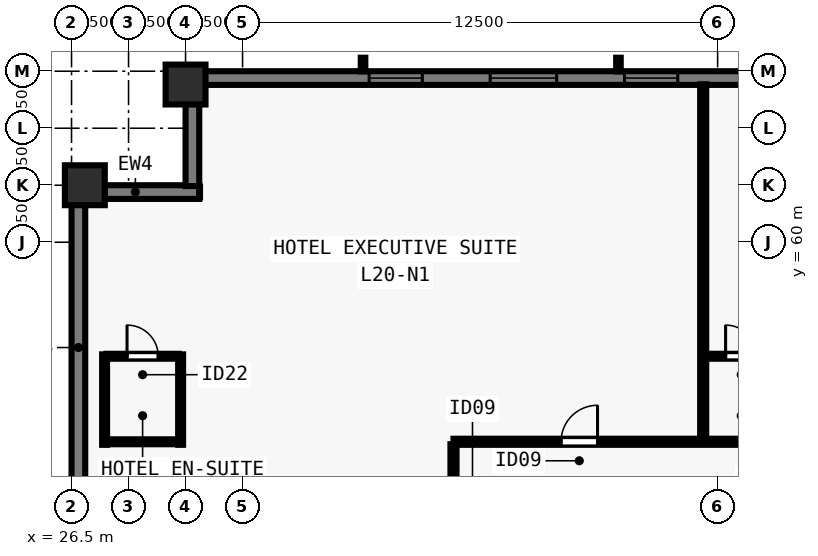
"""IFC4 building model, lengths in metres.
Left out: names, types, materials, properties, quantities, classifications, styles, units other than length and angle.
Written with IfcOpenShell. Run it as: python <this file> out.ifc"""

import sys

from ifc_helpers import new_model, si_unit, direction, frame, frame_2d, origin, origin_2d, place, context, subcontext, project, spatial, rectangle, extrude, element, fill, save


model = new_model("IFC4")
c1 = context("Model", 3, precision=1e-05, world=origin(), true_north=direction((0.0, 1.0)))
c2 = subcontext(c1, "Body", "Model", "MODEL_VIEW")
j1 = project(units=[si_unit("LENGTHUNIT", "METRE"), si_unit("PLANEANGLEUNIT", "RADIAN")], contexts=[c1])
p1 = place(None, origin())
s1 = spatial("IfcSite", under=j1, at=p1, CompositionType="ELEMENT")
p2 = place(p1, origin())
s2 = spatial("IfcBuilding", under=s1, at=p2, CompositionType="ELEMENT")
p3 = place(p2, frame((0.0, 0.0, 76.0)))
s3 = spatial("IfcBuildingStorey", under=s2, at=p3, CompositionType="ELEMENT", Elevation=76.0)
for number, where, z_axis, x_axis in (
    (1, (29.5, 64.15, 0.0), (0.0, 0.0, 1.0), (1.0, 0.0, 0.0)),
    (2, (26.85, 61.5, 0.0), (0.0, 0.0, 1.0), (0.0, 1.0, 0.0)),
):
    element("IfcColumn", number, at=place(p3, frame(where, z_axis=z_axis, x_axis=x_axis)), inside=s3, PredefinedType="COLUMN", context=c2, shape_type="SweptSolid", body=[
        extrude(rectangle(XDim=1.05, YDim=1.05, at=origin_2d()), origin(), (0.0, 0.0, 1.0), 3.5),
    ])
p4 = place(p3, frame((26.68, 16.5, 0.0), z_axis=(0.0, 0.0, 1.0), x_axis=(0.0, 1.0, 0.0)))
e3 = element("IfcWall", 3, at=p4, inside=s3, PredefinedType="SOLIDWALL", context=c2, shape_type="SweptSolid", body=[
    extrude(rectangle(XDim=44.662, YDim=0.36, at=frame_2d((22.331, 0.0))), origin(), (0.0, 0.0, 1.0), 3.28),
])
p5 = place(p4, frame((4.83, 0.0, 0.8)))
e4 = element("IfcOpeningElement", 4, at=p5, cuts=e3, PredefinedType="OPENING", context=c2, shape_type="SweptSolid", body=[
    extrude(rectangle(XDim=1.4, YDim=1.544, at=frame_2d((0.7, 0.772))), frame((0.0, 0.19, 0.0), z_axis=(0.0, -1.0, 0.0), x_axis=(1.0, 0.0, 0.0)), (0.0, 0.0, 1.0), 0.38),
])
p6 = place(p4, frame((8.015, 0.0, 0.8)))
e5 = element("IfcOpeningElement", 5, at=p6, cuts=e3, PredefinedType="OPENING", context=c2, shape_type="SweptSolid", body=[
    extrude(rectangle(XDim=1.75, YDim=1.544, at=frame_2d((0.875, 0.772))), frame((0.0, 0.19, 0.0), z_axis=(0.0, -1.0, 0.0), x_axis=(1.0, 0.0, 0.0)), (0.0, 0.0, 1.0), 0.38),
])
p7 = place(p4, frame((11.551, 0.0, 0.8)))
e6 = element("IfcOpeningElement", 6, at=p7, cuts=e3, PredefinedType="OPENING", context=c2, shape_type="SweptSolid", body=[
    extrude(rectangle(XDim=1.4, YDim=1.544, at=frame_2d((0.7, 0.772))), frame((0.0, 0.19, 0.0), z_axis=(0.0, -1.0, 0.0), x_axis=(1.0, 0.0, 0.0)), (0.0, 0.0, 1.0), 0.38),
])
p8 = place(p4, frame((18.721, 0.0, 0.8)))
e7 = element("IfcOpeningElement", 7, at=p8, cuts=e3, PredefinedType="OPENING", context=c2, shape_type="SweptSolid", body=[
    extrude(rectangle(XDim=1.4, YDim=1.544, at=frame_2d((0.7, 0.772))), frame((0.0, 0.19, 0.0), z_axis=(0.0, -1.0, 0.0), x_axis=(1.0, 0.0, 0.0)), (0.0, 0.0, 1.0), 0.38),
])
p9 = place(p4, frame((22.706, 0.0, 0.8)))
e8 = element("IfcOpeningElement", 8, at=p9, cuts=e3, PredefinedType="OPENING", context=c2, shape_type="SweptSolid", body=[
    extrude(rectangle(XDim=1.75, YDim=1.544, at=frame_2d((0.875, 0.772))), frame((0.0, 0.19, 0.0), z_axis=(0.0, -1.0, 0.0), x_axis=(1.0, 0.0, 0.0)), (0.0, 0.0, 1.0), 0.38),
])
p10 = place(p4, frame((24.991, 0.0, 0.8)))
e9 = element("IfcOpeningElement", 9, at=p10, cuts=e3, PredefinedType="OPENING", context=c2, shape_type="SweptSolid", body=[
    extrude(rectangle(XDim=1.4, YDim=1.544, at=frame_2d((0.7, 0.772))), frame((0.0, 0.19, 0.0), z_axis=(0.0, -1.0, 0.0), x_axis=(1.0, 0.0, 0.0)), (0.0, 0.0, 1.0), 0.38),
])
p11 = place(p4, frame((28.177, 0.0, 0.8)))
e10 = element("IfcOpeningElement", 10, at=p11, cuts=e3, PredefinedType="OPENING", context=c2, shape_type="SweptSolid", body=[
    extrude(rectangle(XDim=1.75, YDim=1.544, at=frame_2d((0.875, 0.772))), frame((0.0, 0.19, 0.0), z_axis=(0.0, -1.0, 0.0), x_axis=(1.0, 0.0, 0.0)), (0.0, 0.0, 1.0), 0.38),
])
p12 = place(p4, frame((31.711, 0.0, 0.8)))
e11 = element("IfcOpeningElement", 11, at=p12, cuts=e3, PredefinedType="OPENING", context=c2, shape_type="SweptSolid", body=[
    extrude(rectangle(XDim=1.4, YDim=1.544, at=frame_2d((0.7, 0.772))), frame((0.0, 0.19, 0.0), z_axis=(0.0, -1.0, 0.0), x_axis=(1.0, 0.0, 0.0)), (0.0, 0.0, 1.0), 0.38),
])
p13 = place(p4, frame((34.897, 0.0, 0.8)))
e12 = element("IfcOpeningElement", 12, at=p13, cuts=e3, PredefinedType="OPENING", context=c2, shape_type="SweptSolid", body=[
    extrude(rectangle(XDim=1.75, YDim=1.544, at=frame_2d((0.875, 0.772))), frame((0.0, 0.19, 0.0), z_axis=(0.0, -1.0, 0.0), x_axis=(1.0, 0.0, 0.0)), (0.0, 0.0, 1.0), 0.38),
])
p14 = place(p3, frame((26.5, 61.32, 0.0), z_axis=(0.0, 0.0, 1.0), x_axis=(1.0, 0.0, 0.0)))
e13 = element("IfcWall", 13, at=p14, inside=s3, PredefinedType="SOLIDWALL", context=c2, shape_type="SweptSolid", body=[
    extrude(rectangle(XDim=3.36, YDim=0.36, at=frame_2d((1.68, 0.0))), origin(), (0.0, 0.0, 1.0), 3.28),
])
p15 = place(p3, frame((29.68, 61.478, 0.0), z_axis=(0.0, 0.0, 1.0), x_axis=(0.0, 1.0, 0.0)))
e14 = element("IfcWall", 14, at=p15, inside=s3, PredefinedType="SOLIDWALL", context=c2, shape_type="SweptSolid", body=[
    extrude(rectangle(XDim=2.684, YDim=0.36, at=frame_2d((1.342, 0.0))), origin(), (0.0, 0.0, 1.0), 3.28),
])
p16 = place(p3, frame((29.5, 64.32, 0.0), z_axis=(0.0, 0.0, 1.0), x_axis=(1.0, 0.0, 0.0)))
e15 = element("IfcWall", 15, at=p16, inside=s3, PredefinedType="SOLIDWALL", context=c2, shape_type="SweptSolid", body=[
    extrude(rectangle(XDim=44.662, YDim=0.36, at=frame_2d((22.331, 0.0))), origin(), (0.0, 0.0, 1.0), 3.28),
])
p17 = place(p16, frame((4.83, 0.0, 0.8)))
e16 = element("IfcOpeningElement", 16, at=p17, cuts=e15, PredefinedType="OPENING", context=c2, shape_type="SweptSolid", body=[
    extrude(rectangle(XDim=1.4, YDim=1.544, at=frame_2d((0.7, 0.772))), frame((0.0, 0.19, 0.0), z_axis=(0.0, -1.0, 0.0), x_axis=(1.0, 0.0, 0.0)), (0.0, 0.0, 1.0), 0.38),
])
p18 = place(p16, frame((8.015, 0.0, 0.8)))
e17 = element("IfcOpeningElement", 17, at=p18, cuts=e15, PredefinedType="OPENING", context=c2, shape_type="SweptSolid", body=[
    extrude(rectangle(XDim=1.75, YDim=1.544, at=frame_2d((0.875, 0.772))), frame((0.0, 0.19, 0.0), z_axis=(0.0, -1.0, 0.0), x_axis=(1.0, 0.0, 0.0)), (0.0, 0.0, 1.0), 0.38),
])
p19 = place(p16, frame((11.551, 0.0, 0.8)))
e18 = element("IfcOpeningElement", 18, at=p19, cuts=e15, PredefinedType="OPENING", context=c2, shape_type="SweptSolid", body=[
    extrude(rectangle(XDim=1.4, YDim=1.544, at=frame_2d((0.7, 0.772))), frame((0.0, 0.19, 0.0), z_axis=(0.0, -1.0, 0.0), x_axis=(1.0, 0.0, 0.0)), (0.0, 0.0, 1.0), 0.38),
])
p20 = place(p16, frame((14.736, 0.0, 0.8)))
e19 = element("IfcOpeningElement", 19, at=p20, cuts=e15, PredefinedType="OPENING", context=c2, shape_type="SweptSolid", body=[
    extrude(rectangle(XDim=1.75, YDim=1.544, at=frame_2d((0.875, 0.772))), frame((0.0, 0.19, 0.0), z_axis=(0.0, -1.0, 0.0), x_axis=(1.0, 0.0, 0.0)), (0.0, 0.0, 1.0), 0.38),
])
p21 = place(p16, frame((18.721, 0.0, 0.8)))
e20 = element("IfcOpeningElement", 20, at=p21, cuts=e15, PredefinedType="OPENING", context=c2, shape_type="SweptSolid", body=[
    extrude(rectangle(XDim=1.4, YDim=1.544, at=frame_2d((0.7, 0.772))), frame((0.0, 0.19, 0.0), z_axis=(0.0, -1.0, 0.0), x_axis=(1.0, 0.0, 0.0)), (0.0, 0.0, 1.0), 0.38),
])
p22 = place(p16, frame((21.456, 0.0, 0.8)))
e21 = element("IfcOpeningElement", 21, at=p22, cuts=e15, PredefinedType="OPENING", context=c2, shape_type="SweptSolid", body=[
    extrude(rectangle(XDim=1.75, YDim=1.544, at=frame_2d((0.875, 0.772))), frame((0.0, 0.19, 0.0), z_axis=(0.0, -1.0, 0.0), x_axis=(1.0, 0.0, 0.0)), (0.0, 0.0, 1.0), 0.38),
])
p23 = place(p16, frame((24.991, 0.0, 0.8)))
e22 = element("IfcOpeningElement", 22, at=p23, cuts=e15, PredefinedType="OPENING", context=c2, shape_type="SweptSolid", body=[
    extrude(rectangle(XDim=1.4, YDim=1.544, at=frame_2d((0.7, 0.772))), frame((0.0, 0.19, 0.0), z_axis=(0.0, -1.0, 0.0), x_axis=(1.0, 0.0, 0.0)), (0.0, 0.0, 1.0), 0.38),
])
p24 = place(p16, frame((28.177, 0.0, 0.8)))
e23 = element("IfcOpeningElement", 23, at=p24, cuts=e15, PredefinedType="OPENING", context=c2, shape_type="SweptSolid", body=[
    extrude(rectangle(XDim=1.75, YDim=1.544, at=frame_2d((0.875, 0.772))), frame((0.0, 0.19, 0.0), z_axis=(0.0, -1.0, 0.0), x_axis=(1.0, 0.0, 0.0)), (0.0, 0.0, 1.0), 0.38),
])
p25 = place(p16, frame((31.711, 0.0, 0.8)))
e24 = element("IfcOpeningElement", 24, at=p25, cuts=e15, PredefinedType="OPENING", context=c2, shape_type="SweptSolid", body=[
    extrude(rectangle(XDim=1.4, YDim=1.544, at=frame_2d((0.7, 0.772))), frame((0.0, 0.19, 0.0), z_axis=(0.0, -1.0, 0.0), x_axis=(1.0, 0.0, 0.0)), (0.0, 0.0, 1.0), 0.38),
])
p26 = place(p16, frame((34.897, 0.0, 0.8)))
e25 = element("IfcOpeningElement", 25, at=p26, cuts=e15, PredefinedType="OPENING", context=c2, shape_type="SweptSolid", body=[
    extrude(rectangle(XDim=1.75, YDim=1.544, at=frame_2d((0.875, 0.772))), frame((0.0, 0.19, 0.0), z_axis=(0.0, -1.0, 0.0), x_axis=(1.0, 0.0, 0.0)), (0.0, 0.0, 1.0), 0.38),
])
p27 = place(p16, frame((38.432, 0.0, 0.8)))
e26 = element("IfcOpeningElement", 26, at=p27, cuts=e15, PredefinedType="OPENING", context=c2, shape_type="SweptSolid", body=[
    extrude(rectangle(XDim=1.4, YDim=1.544, at=frame_2d((0.7, 0.772))), frame((0.0, 0.19, 0.0), z_axis=(0.0, -1.0, 0.0), x_axis=(1.0, 0.0, 0.0)), (0.0, 0.0, 1.0), 0.38),
])
p28 = place(p3, frame((36.55, 54.75, 0.0), z_axis=(0.0, 0.0, 1.0), x_axis=(1.0, 0.0, 0.0)))
e27 = element("IfcWall", 27, at=p28, inside=s3, PredefinedType="PARTITIONING", context=c2, shape_type="SweptSolid", body=[
    extrude(rectangle(XDim=30.9, YDim=0.16, at=frame_2d((15.45, 0.0))), origin(), (0.0, 0.0, 1.0), 3.28),
])
p29 = place(p28, frame((2.83, 0.0, 0.0)))
e28 = element("IfcOpeningElement", 28, at=p29, cuts=e27, PredefinedType="OPENING", context=c2, shape_type="SweptSolid", body=[
    extrude(rectangle(XDim=0.96, YDim=2.15, at=frame_2d((0.48, 1.075))), frame((0.0, 0.09, 0.0), z_axis=(0.0, -1.0, 0.0), x_axis=(1.0, 0.0, 0.0)), (0.0, 0.0, 1.0), 0.18),
])
p30 = place(p28, frame((15.965, 0.0, 0.0)))
e29 = element("IfcOpeningElement", 29, at=p30, cuts=e27, PredefinedType="OPENING", context=c2, shape_type="SweptSolid", body=[
    extrude(rectangle(XDim=0.96, YDim=2.15, at=frame_2d((0.48, 1.075))), frame((0.0, 0.09, 0.0), z_axis=(0.0, -1.0, 0.0), x_axis=(1.0, 0.0, 0.0)), (0.0, 0.0, 1.0), 0.18),
])
p31 = place(p28, frame((28.105, 0.0, 0.0)))
e30 = element("IfcOpeningElement", 30, at=p31, cuts=e27, PredefinedType="OPENING", context=c2, shape_type="SweptSolid", body=[
    extrude(rectangle(XDim=0.96, YDim=2.15, at=frame_2d((0.48, 1.075))), frame((0.0, 0.09, 0.0), z_axis=(0.0, -1.0, 0.0), x_axis=(1.0, 0.0, 0.0)), (0.0, 0.0, 1.0), 0.18),
])
p32 = place(p3, frame((36.55, 23.315, 0.0), z_axis=(0.0, 0.0, 1.0), x_axis=(0.0, 1.0, 0.0)))
e31 = element("IfcWall", 31, at=p32, inside=s3, PredefinedType="PARTITIONING", context=c2, shape_type="SweptSolid", body=[
    extrude(rectangle(XDim=31.37, YDim=0.16, at=frame_2d((15.685, 0.0))), origin(), (0.0, 0.0, 1.0), 3.28),
])
p33 = place(p32, frame((4.848, 0.0, 0.0)))
e32 = element("IfcOpeningElement", 32, at=p33, cuts=e31, PredefinedType="OPENING", context=c2, shape_type="SweptSolid", body=[
    extrude(rectangle(XDim=0.96, YDim=2.15, at=frame_2d((0.48, 1.075))), frame((0.0, 0.09, 0.0), z_axis=(0.0, -1.0, 0.0), x_axis=(1.0, 0.0, 0.0)), (0.0, 0.0, 1.0), 0.18),
])
p34 = place(p32, frame((12.39, 0.0, 0.0)))
e33 = element("IfcOpeningElement", 33, at=p34, cuts=e31, PredefinedType="OPENING", context=c2, shape_type="SweptSolid", body=[
    extrude(rectangle(XDim=0.96, YDim=2.15, at=frame_2d((0.48, 1.075))), frame((0.0, 0.09, 0.0), z_axis=(0.0, -1.0, 0.0), x_axis=(1.0, 0.0, 0.0)), (0.0, 0.0, 1.0), 0.18),
])
p35 = place(p32, frame((20.265, 0.0, 0.0)))
e34 = element("IfcOpeningElement", 34, at=p35, cuts=e31, PredefinedType="OPENING", context=c2, shape_type="SweptSolid", body=[
    extrude(rectangle(XDim=0.96, YDim=2.15, at=frame_2d((0.48, 1.075))), frame((0.0, 0.09, 0.0), z_axis=(0.0, -1.0, 0.0), x_axis=(1.0, 0.0, 0.0)), (0.0, 0.0, 1.0), 0.18),
])
p36 = place(p32, frame((28.223, 0.0, 0.0)))
e35 = element("IfcOpeningElement", 35, at=p36, cuts=e31, PredefinedType="OPENING", context=c2, shape_type="SweptSolid", body=[
    extrude(rectangle(XDim=0.96, YDim=2.15, at=frame_2d((0.48, 1.075))), frame((0.0, 0.09, 0.0), z_axis=(0.0, -1.0, 0.0), x_axis=(1.0, 0.0, 0.0)), (0.0, 0.0, 1.0), 0.18),
])
for number, where, z_axis, x_axis in (
    (36, (27.37, 54.67, 0.0), (0.0, 0.0, 1.0), (0.0, 1.0, 0.0)),
    (37, (29.37, 54.67, 0.0), (0.0, 0.0, 1.0), (0.0, 1.0, 0.0)),
):
    element("IfcWall", number, at=place(p3, frame(where, z_axis=z_axis, x_axis=x_axis)), inside=s3, PredefinedType="PLUMBINGWALL", context=c2, shape_type="SweptSolid", body=[
        extrude(rectangle(XDim=2.38, YDim=0.13, at=frame_2d((1.19, 0.0))), origin(), (0.0, 0.0, 1.0), 3.28),
    ])
p37 = place(p3, frame((27.42, 57.0, 0.0), z_axis=(0.0, 0.0, 1.0), x_axis=(1.0, 0.0, 0.0)))
e38 = element("IfcWall", 38, at=p37, inside=s3, PredefinedType="PLUMBINGWALL", context=c2, shape_type="SweptSolid", body=[
    extrude(rectangle(XDim=1.9, YDim=0.13, at=frame_2d((0.95, 0.0))), origin(), (0.0, 0.0, 1.0), 3.28),
])
p38 = place(p37, frame((0.54, 0.0, 0.0)))
e39 = element("IfcOpeningElement", 39, at=p38, cuts=e38, PredefinedType="OPENING", context=c2, shape_type="SweptSolid", body=[
    extrude(rectangle(XDim=0.82, YDim=2.1, at=frame_2d((0.41, 1.05))), frame((0.0, 0.075, 0.0), z_axis=(0.0, -1.0, 0.0), x_axis=(1.0, 0.0, 0.0)), (0.0, 0.0, 1.0), 0.15),
])
p39 = place(p3, frame((27.42, 54.75, 0.0), z_axis=(0.0, 0.0, 1.0), x_axis=(1.0, 0.0, 0.0)))
e40 = element("IfcWall", 40, at=p39, inside=s3, PredefinedType="PLUMBINGWALL", context=c2, shape_type="SweptSolid", body=[
    extrude(rectangle(XDim=1.9, YDim=0.13, at=frame_2d((0.95, 0.0))), origin(), (0.0, 0.0, 1.0), 3.28),
])
p40 = place(p3, frame((43.12, 54.815, 0.0), z_axis=(0.0, 0.0, 1.0), x_axis=(0.0, 1.0, 0.0)))
e41 = element("IfcWall", 41, at=p40, inside=s3, PredefinedType="PARTITIONING", context=c2, shape_type="SweptSolid", body=[
    extrude(rectangle(XDim=9.34, YDim=0.16, at=frame_2d((4.67, 0.0))), origin(), (0.0, 0.0, 1.0), 3.28),
])
p41 = place(p3, frame((43.185, 57.0, 0.0), z_axis=(0.0, 0.0, 1.0), x_axis=(1.0, 0.0, 0.0)))
e42 = element("IfcWall", 42, at=p41, inside=s3, PredefinedType="PLUMBINGWALL", context=c2, shape_type="SweptSolid", body=[
    extrude(rectangle(XDim=1.885, YDim=0.13, at=frame_2d((0.942, 0.0))), origin(), (0.0, 0.0, 1.0), 3.28),
])
p42 = place(p41, frame((0.525, 0.0, 0.0)))
e43 = element("IfcOpeningElement", 43, at=p42, cuts=e42, PredefinedType="OPENING", context=c2, shape_type="SweptSolid", body=[
    extrude(rectangle(XDim=0.82, YDim=2.1, at=frame_2d((0.41, 1.05))), frame((0.0, 0.075, 0.0), z_axis=(0.0, -1.0, 0.0), x_axis=(1.0, 0.0, 0.0)), (0.0, 0.0, 1.0), 0.15),
])
p43 = place(p17, origin())
e44 = element("IfcWindow", 44, at=p43, inside=s3, PartitioningType="SINGLE_PANEL", PredefinedType="WINDOW", context=c2, shape_type="SweptSolid", body=[
    extrude(rectangle(XDim=1.4, YDim=1.544, at=frame_2d((0.7, 0.772))), frame((0.0, -0.05, 0.0), z_axis=(0.0, -1.0, 0.0), x_axis=(1.0, 0.0, 0.0)), (0.0, 0.0, 1.0), 0.06),
])
fill(e16, e44)
p44 = place(p18, origin())
e45 = element("IfcWindow", 45, at=p44, inside=s3, PartitioningType="SINGLE_PANEL", PredefinedType="WINDOW", context=c2, shape_type="SweptSolid", body=[
    extrude(rectangle(XDim=1.75, YDim=1.544, at=frame_2d((0.875, 0.772))), frame((0.0, -0.05, 0.0), z_axis=(0.0, -1.0, 0.0), x_axis=(1.0, 0.0, 0.0)), (0.0, 0.0, 1.0), 0.06),
])
fill(e17, e45)
p45 = place(p19, origin())
e46 = element("IfcWindow", 46, at=p45, inside=s3, PartitioningType="SINGLE_PANEL", PredefinedType="WINDOW", context=c2, shape_type="SweptSolid", body=[
    extrude(rectangle(XDim=1.4, YDim=1.544, at=frame_2d((0.7, 0.772))), frame((0.0, -0.05, 0.0), z_axis=(0.0, -1.0, 0.0), x_axis=(1.0, 0.0, 0.0)), (0.0, 0.0, 1.0), 0.06),
])
fill(e18, e46)
p46 = place(p38, origin())
e47 = element("IfcDoor", 47, at=p46, inside=s3, OperationType="SINGLE_SWING_LEFT", PredefinedType="DOOR", context=c2, shape_type="SweptSolid", body=[
    extrude(rectangle(XDim=0.82, YDim=2.1, at=frame_2d((0.41, 1.05))), frame((0.0, 0.025, 0.0), z_axis=(0.0, -1.0, 0.0), x_axis=(1.0, 0.0, 0.0)), (0.0, 0.0, 1.0), 0.05),
])
fill(e39, e47)
p47 = place(p29, origin())
e48 = element("IfcDoor", 48, at=p47, inside=s3, OperationType="SINGLE_SWING_RIGHT", PredefinedType="DOOR", context=c2, shape_type="SweptSolid", body=[
    extrude(rectangle(XDim=0.96, YDim=2.15, at=frame_2d((0.48, 1.075))), frame((0.0, 0.025, 0.0), z_axis=(0.0, -1.0, 0.0), x_axis=(1.0, 0.0, 0.0)), (0.0, 0.0, 1.0), 0.05),
])
fill(e28, e48)
p48 = place(p42, origin())
e49 = element("IfcDoor", 49, at=p48, inside=s3, OperationType="SINGLE_SWING_LEFT", PredefinedType="DOOR", context=c2, shape_type="SweptSolid", body=[
    extrude(rectangle(XDim=0.82, YDim=2.1, at=frame_2d((0.41, 1.05))), frame((0.0, 0.025, 0.0), z_axis=(0.0, -1.0, 0.0), x_axis=(1.0, 0.0, 0.0)), (0.0, 0.0, 1.0), 0.05),
])
fill(e43, e49)
save(model, sys.argv[1])
